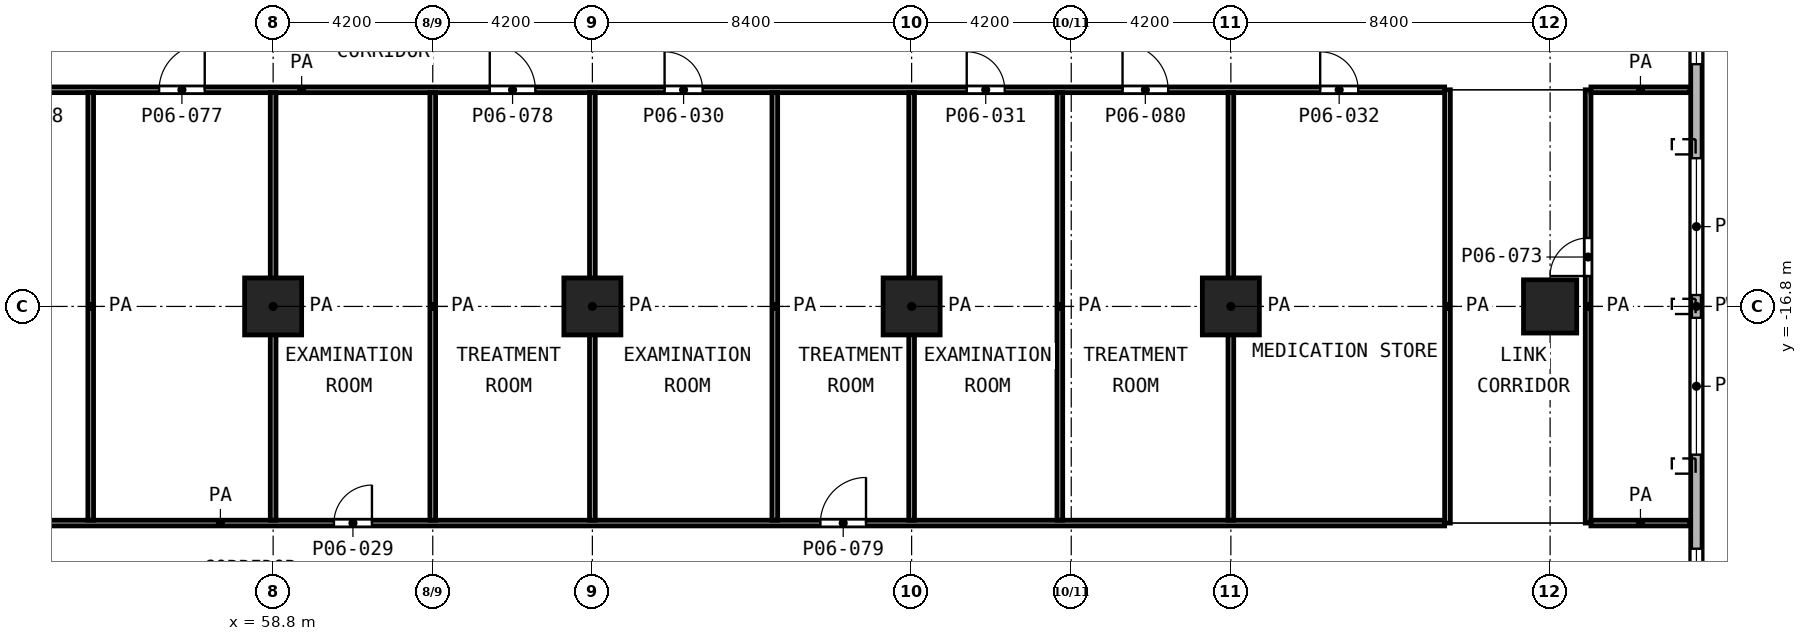
"""IFC4 building model, lengths in metres.
Left out: names, types, materials, properties, quantities, classifications, styles, units other than length and angle.
Written with IfcOpenShell. Run it as: python <this file> out.ifc"""

import sys

from ifc_helpers import new_model, si_unit, direction, frame, frame_2d, origin, origin_2d, place, context, subcontext, project, spatial, rectangle, extrude, element, fill, save


model = new_model("IFC4")
c1 = context("Model", 3, precision=1e-05, world=origin(), true_north=direction((0.0, 1.0)))
c2 = subcontext(c1, "Body", "Model", "MODEL_VIEW")
j1 = project(units=[si_unit("LENGTHUNIT", "METRE"), si_unit("PLANEANGLEUNIT", "RADIAN")], contexts=[c1])
p1 = place(None, origin())
s1 = spatial("IfcSite", under=j1, at=p1, CompositionType="ELEMENT")
p2 = place(p1, origin())
s2 = spatial("IfcBuilding", under=s1, at=p2, CompositionType="ELEMENT")
p3 = place(p2, frame((0.0, 0.0, 29.0)))
s3 = spatial("IfcBuildingStorey", under=s2, at=p3, CompositionType="ELEMENT", Elevation=29.0)
for number, where, z_axis, x_axis in (
    (1, (58.8, -16.8, 0.0), (0.0, 0.0, 1.0), (1.0, 0.0, 0.0)),
    (2, (67.2, -16.8, 0.0), (0.0, 0.0, 1.0), (1.0, 0.0, 0.0)),
    (3, (75.6, -16.8, 0.0), (0.0, 0.0, 1.0), (1.0, 0.0, 0.0)),
    (4, (84.0, -16.8, 0.0), (0.0, 0.0, 1.0), (1.0, 0.0, 0.0)),
):
    element("IfcColumn", number, at=place(p3, frame(where, z_axis=z_axis, x_axis=x_axis)), inside=s3, PredefinedType="COLUMN", context=c2, shape_type="SweptSolid", body=[
        extrude(rectangle(XDim=1.5, YDim=1.5, at=origin_2d()), origin(), (0.0, 0.0, 1.0), 5.2),
    ])
p4 = place(p3, frame((92.4, -16.8, 0.0), z_axis=(0.0, 0.0, 1.0), x_axis=(1.0, 0.0, 0.0)))
e5 = element("IfcColumn", 5, at=p4, inside=s3, PredefinedType="COLUMN", context=c2, shape_type="SweptSolid", body=[
    extrude(rectangle(XDim=1.4, YDim=1.4, at=origin_2d()), origin(), (0.0, 0.0, 1.0), 5.2),
])
p5 = place(p3, frame((96.25, -31.538, 0.0), z_axis=(0.0, 0.0, 1.0), x_axis=(0.0, 1.0, 0.0)))
e6 = element("IfcWall", 6, at=p5, inside=s3, PredefinedType="SOLIDWALL", context=c2, shape_type="SweptSolid", body=[
    extrude(rectangle(XDim=29.476, YDim=0.3, at=frame_2d((14.738, 0.0))), origin(), (0.0, 0.0, 1.0), 4.7),
])
p6 = place(p5, frame((0.438, 0.0, 0.9)))
e7 = element("IfcOpeningElement", 7, at=p6, cuts=e6, PredefinedType="OPENING", context=c2, shape_type="SweptSolid", body=[
    extrude(rectangle(XDim=1.2, YDim=3.0, at=frame_2d((0.6, 1.5))), frame((0.0, 0.16, 0.0), z_axis=(0.0, -1.0, 0.0), x_axis=(1.0, 0.0, 0.0)), (0.0, 0.0, 1.0), 0.32),
])
p7 = place(p5, frame((2.438, 0.0, 0.9)))
e8 = element("IfcOpeningElement", 8, at=p7, cuts=e6, PredefinedType="OPENING", context=c2, shape_type="SweptSolid", body=[
    extrude(rectangle(XDim=3.6, YDim=3.0, at=frame_2d((1.8, 1.5))), frame((0.0, 0.16, 0.0), z_axis=(0.0, -1.0, 0.0), x_axis=(1.0, 0.0, 0.0)), (0.0, 0.0, 1.0), 0.32),
])
p8 = place(p5, frame((7.163, 0.0, 0.9)))
e9 = element("IfcOpeningElement", 9, at=p8, cuts=e6, PredefinedType="OPENING", context=c2, shape_type="SweptSolid", body=[
    extrude(rectangle(XDim=1.2, YDim=3.0, at=frame_2d((0.6, 1.5))), frame((0.0, 0.16, 0.0), z_axis=(0.0, -1.0, 0.0), x_axis=(1.0, 0.0, 0.0)), (0.0, 0.0, 1.0), 0.32),
])
p9 = place(p5, frame((10.838, 0.0, 0.9)))
e10 = element("IfcOpeningElement", 10, at=p9, cuts=e6, PredefinedType="OPENING", context=c2, shape_type="SweptSolid", body=[
    extrude(rectangle(XDim=3.6, YDim=3.0, at=frame_2d((1.8, 1.5))), frame((0.0, 0.16, 0.0), z_axis=(0.0, -1.0, 0.0), x_axis=(1.0, 0.0, 0.0)), (0.0, 0.0, 1.0), 0.32),
])
p10 = place(p5, frame((15.038, 0.0, 0.9)))
e11 = element("IfcOpeningElement", 11, at=p10, cuts=e6, PredefinedType="OPENING", context=c2, shape_type="SweptSolid", body=[
    extrude(rectangle(XDim=3.6, YDim=3.0, at=frame_2d((1.8, 1.5))), frame((0.0, 0.16, 0.0), z_axis=(0.0, -1.0, 0.0), x_axis=(1.0, 0.0, 0.0)), (0.0, 0.0, 1.0), 0.32),
])
p11 = place(p5, frame((21.113, 0.0, 0.9)))
e12 = element("IfcOpeningElement", 12, at=p11, cuts=e6, PredefinedType="OPENING", context=c2, shape_type="SweptSolid", body=[
    extrude(rectangle(XDim=1.2, YDim=3.0, at=frame_2d((0.6, 1.5))), frame((0.0, 0.16, 0.0), z_axis=(0.0, -1.0, 0.0), x_axis=(1.0, 0.0, 0.0)), (0.0, 0.0, 1.0), 0.32),
])
p12 = place(p5, frame((23.438, 0.0, 0.9)))
e13 = element("IfcOpeningElement", 13, at=p12, cuts=e6, PredefinedType="OPENING", context=c2, shape_type="SweptSolid", body=[
    extrude(rectangle(XDim=3.6, YDim=3.0, at=frame_2d((1.8, 1.5))), frame((0.0, 0.16, 0.0), z_axis=(0.0, -1.0, 0.0), x_axis=(1.0, 0.0, 0.0)), (0.0, 0.0, 1.0), 0.32),
])
p13 = place(p5, frame((27.838, 0.0, 0.9)))
e14 = element("IfcOpeningElement", 14, at=p13, cuts=e6, PredefinedType="OPENING", context=c2, shape_type="SweptSolid", body=[
    extrude(rectangle(XDim=1.2, YDim=3.0, at=frame_2d((0.6, 1.5))), frame((0.0, 0.16, 0.0), z_axis=(0.0, -1.0, 0.0), x_axis=(1.0, 0.0, 0.0)), (0.0, 0.0, 1.0), 0.32),
])
p14 = place(p3, frame((25.2, -22.5, 0.0), z_axis=(0.0, 0.0, 1.0), x_axis=(1.0, 0.0, 0.0)))
e15 = element("IfcWall", 15, at=p14, inside=s3, PredefinedType="PARTITIONING", context=c2, shape_type="SweptSolid", body=[
    extrude(rectangle(XDim=64.425, YDim=0.15, at=frame_2d((32.212, 0.0))), origin(), (0.0, 0.0, 1.0), 4.7),
])
p15 = place(p14, frame((1.9, 0.0, 0.0)))
e16 = element("IfcOpeningElement", 16, at=p15, cuts=e15, PredefinedType="OPENING", context=c2, shape_type="SweptSolid", body=[
    extrude(rectangle(XDim=1.0, YDim=2.1, at=frame_2d((0.5, 1.05))), frame((0.0, 0.085, 0.0), z_axis=(0.0, -1.0, 0.0), x_axis=(1.0, 0.0, 0.0)), (0.0, 0.0, 1.0), 0.17),
])
p16 = place(p14, frame((9.85, 0.0, 0.0)))
e17 = element("IfcOpeningElement", 17, at=p16, cuts=e15, PredefinedType="OPENING", context=c2, shape_type="SweptSolid", body=[
    extrude(rectangle(XDim=1.0, YDim=2.1, at=frame_2d((0.5, 1.05))), frame((0.0, 0.085, 0.0), z_axis=(0.0, -1.0, 0.0), x_axis=(1.0, 0.0, 0.0)), (0.0, 0.0, 1.0), 0.17),
])
p17 = place(p14, frame((22.65, 0.0, 0.0)))
e18 = element("IfcOpeningElement", 18, at=p17, cuts=e15, PredefinedType="OPENING", context=c2, shape_type="SweptSolid", body=[
    extrude(rectangle(XDim=1.2, YDim=2.1, at=frame_2d((0.6, 1.05))), frame((0.0, 0.085, 0.0), z_axis=(0.0, -1.0, 0.0), x_axis=(1.0, 0.0, 0.0)), (0.0, 0.0, 1.0), 0.17),
])
p18 = place(p14, frame((35.2, 0.0, 0.0)))
e19 = element("IfcOpeningElement", 19, at=p18, cuts=e15, PredefinedType="OPENING", context=c2, shape_type="SweptSolid", body=[
    extrude(rectangle(XDim=1.0, YDim=2.1, at=frame_2d((0.5, 1.05))), frame((0.0, 0.085, 0.0), z_axis=(0.0, -1.0, 0.0), x_axis=(1.0, 0.0, 0.0)), (0.0, 0.0, 1.0), 0.17),
])
p19 = place(p14, frame((48.0, 0.0, 0.0)))
e20 = element("IfcOpeningElement", 20, at=p19, cuts=e15, PredefinedType="OPENING", context=c2, shape_type="SweptSolid", body=[
    extrude(rectangle(XDim=1.2, YDim=2.1, at=frame_2d((0.6, 1.05))), frame((0.0, 0.085, 0.0), z_axis=(0.0, -1.0, 0.0), x_axis=(1.0, 0.0, 0.0)), (0.0, 0.0, 1.0), 0.17),
])
p20 = place(p3, frame((93.475, -22.5, 0.0), z_axis=(0.0, 0.0, 1.0), x_axis=(1.0, 0.0, 0.0)))
e21 = element("IfcWall", 21, at=p20, inside=s3, PredefinedType="PARTITIONING", context=c2, shape_type="SweptSolid", body=[
    extrude(rectangle(XDim=2.605, YDim=0.15, at=frame_2d((1.302, 0.0))), origin(), (0.0, 0.0, 1.0), 4.7),
])
p21 = place(p3, frame((29.475, -11.1, 0.0), z_axis=(0.0, 0.0, 1.0), x_axis=(1.0, 0.0, 0.0)))
e22 = element("IfcWall", 22, at=p21, inside=s3, PredefinedType="PARTITIONING", context=c2, shape_type="SweptSolid", body=[
    extrude(rectangle(XDim=60.15, YDim=0.15, at=frame_2d((30.075, 0.0))), origin(), (0.0, 0.0, 1.0), 4.7),
])
p22 = place(p21, frame((1.825, 0.0, 0.0)))
e23 = element("IfcOpeningElement", 23, at=p22, cuts=e22, PredefinedType="OPENING", context=c2, shape_type="SweptSolid", body=[
    extrude(rectangle(XDim=1.0, YDim=2.1, at=frame_2d((0.5, 1.05))), frame((0.0, 0.085, 0.0), z_axis=(0.0, -1.0, 0.0), x_axis=(1.0, 0.0, 0.0)), (0.0, 0.0, 1.0), 0.17),
])
p23 = place(p21, frame((9.775, 0.0, 0.0)))
e24 = element("IfcOpeningElement", 24, at=p23, cuts=e22, PredefinedType="OPENING", context=c2, shape_type="SweptSolid", body=[
    extrude(rectangle(XDim=1.0, YDim=2.1, at=frame_2d((0.5, 1.05))), frame((0.0, 0.085, 0.0), z_axis=(0.0, -1.0, 0.0), x_axis=(1.0, 0.0, 0.0)), (0.0, 0.0, 1.0), 0.17),
])
p24 = place(p21, frame((14.275, 0.0, 0.0)))
e25 = element("IfcOpeningElement", 25, at=p24, cuts=e22, PredefinedType="OPENING", context=c2, shape_type="SweptSolid", body=[
    extrude(rectangle(XDim=1.0, YDim=2.1, at=frame_2d((0.5, 1.05))), frame((0.0, 0.085, 0.0), z_axis=(0.0, -1.0, 0.0), x_axis=(1.0, 0.0, 0.0)), (0.0, 0.0, 1.0), 0.17),
])
p25 = place(p21, frame((22.225, 0.0, 0.0)))
e26 = element("IfcOpeningElement", 26, at=p25, cuts=e22, PredefinedType="OPENING", context=c2, shape_type="SweptSolid", body=[
    extrude(rectangle(XDim=1.0, YDim=2.1, at=frame_2d((0.5, 1.05))), frame((0.0, 0.085, 0.0), z_axis=(0.0, -1.0, 0.0), x_axis=(1.0, 0.0, 0.0)), (0.0, 0.0, 1.0), 0.17),
])
p26 = place(p21, frame((26.325, 0.0, 0.0)))
e27 = element("IfcOpeningElement", 27, at=p26, cuts=e22, PredefinedType="OPENING", context=c2, shape_type="SweptSolid", body=[
    extrude(rectangle(XDim=1.2, YDim=2.1, at=frame_2d((0.6, 1.05))), frame((0.0, 0.085, 0.0), z_axis=(0.0, -1.0, 0.0), x_axis=(1.0, 0.0, 0.0)), (0.0, 0.0, 1.0), 0.17),
])
p27 = place(p21, frame((35.025, 0.0, 0.0)))
e28 = element("IfcOpeningElement", 28, at=p27, cuts=e22, PredefinedType="OPENING", context=c2, shape_type="SweptSolid", body=[
    extrude(rectangle(XDim=1.2, YDim=2.1, at=frame_2d((0.6, 1.05))), frame((0.0, 0.085, 0.0), z_axis=(0.0, -1.0, 0.0), x_axis=(1.0, 0.0, 0.0)), (0.0, 0.0, 1.0), 0.17),
])
p28 = place(p21, frame((39.625, 0.0, 0.0)))
e29 = element("IfcOpeningElement", 29, at=p28, cuts=e22, PredefinedType="OPENING", context=c2, shape_type="SweptSolid", body=[
    extrude(rectangle(XDim=1.0, YDim=2.1, at=frame_2d((0.5, 1.05))), frame((0.0, 0.085, 0.0), z_axis=(0.0, -1.0, 0.0), x_axis=(1.0, 0.0, 0.0)), (0.0, 0.0, 1.0), 0.17),
])
p29 = place(p21, frame((47.575, 0.0, 0.0)))
e30 = element("IfcOpeningElement", 30, at=p29, cuts=e22, PredefinedType="OPENING", context=c2, shape_type="SweptSolid", body=[
    extrude(rectangle(XDim=1.0, YDim=2.1, at=frame_2d((0.5, 1.05))), frame((0.0, 0.085, 0.0), z_axis=(0.0, -1.0, 0.0), x_axis=(1.0, 0.0, 0.0)), (0.0, 0.0, 1.0), 0.17),
])
p30 = place(p21, frame((51.675, 0.0, 0.0)))
e31 = element("IfcOpeningElement", 31, at=p30, cuts=e22, PredefinedType="OPENING", context=c2, shape_type="SweptSolid", body=[
    extrude(rectangle(XDim=1.2, YDim=2.1, at=frame_2d((0.6, 1.05))), frame((0.0, 0.085, 0.0), z_axis=(0.0, -1.0, 0.0), x_axis=(1.0, 0.0, 0.0)), (0.0, 0.0, 1.0), 0.17),
])
p31 = place(p21, frame((56.875, 0.0, 0.0)))
e32 = element("IfcOpeningElement", 32, at=p31, cuts=e22, PredefinedType="OPENING", context=c2, shape_type="SweptSolid", body=[
    extrude(rectangle(XDim=1.0, YDim=2.1, at=frame_2d((0.5, 1.05))), frame((0.0, 0.085, 0.0), z_axis=(0.0, -1.0, 0.0), x_axis=(1.0, 0.0, 0.0)), (0.0, 0.0, 1.0), 0.17),
])
p32 = place(p3, frame((93.475, -11.1, 0.0), z_axis=(0.0, 0.0, 1.0), x_axis=(1.0, 0.0, 0.0)))
e33 = element("IfcWall", 33, at=p32, inside=s3, PredefinedType="PARTITIONING", context=c2, shape_type="SweptSolid", body=[
    extrude(rectangle(XDim=2.605, YDim=0.15, at=frame_2d((1.302, 0.0))), origin(), (0.0, 0.0, 1.0), 4.7),
])
for number, where, z_axis, x_axis in (
    (34, (54.0, -22.425, 0.0), (0.0, 0.0, 1.0), (0.0, 1.0, 0.0)),
    (35, (58.8, -22.425, 0.0), (0.0, 0.0, 1.0), (0.0, 1.0, 0.0)),
    (36, (63.0, -22.425, 0.0), (0.0, 0.0, 1.0), (0.0, 1.0, 0.0)),
    (37, (67.2, -22.425, 0.0), (0.0, 0.0, 1.0), (0.0, 1.0, 0.0)),
    (38, (72.0, -22.425, 0.0), (0.0, 0.0, 1.0), (0.0, 1.0, 0.0)),
    (39, (75.6, -22.425, 0.0), (0.0, 0.0, 1.0), (0.0, 1.0, 0.0)),
    (40, (79.5, -22.425, 0.0), (0.0, 0.0, 1.0), (0.0, 1.0, 0.0)),
    (41, (84.0, -22.425, 0.0), (0.0, 0.0, 1.0), (0.0, 1.0, 0.0)),
):
    element("IfcWall", number, at=place(p3, frame(where, z_axis=z_axis, x_axis=x_axis)), inside=s3, PredefinedType="PARTITIONING", context=c2, shape_type="SweptSolid", body=[
        extrude(rectangle(XDim=11.25, YDim=0.15, at=frame_2d((5.625, 0.0))), origin(), (0.0, 0.0, 1.0), 4.7),
    ])
p33 = place(p3, frame((89.7, -22.5, 0.0), z_axis=(0.0, 0.0, 1.0), x_axis=(0.0, 1.0, 0.0)))
e42 = element("IfcWall", 42, at=p33, inside=s3, PredefinedType="PARTITIONING", context=c2, shape_type="SweptSolid", body=[
    extrude(rectangle(XDim=11.4, YDim=0.15, at=frame_2d((5.7, 0.0))), origin(), (0.0, 0.0, 1.0), 4.7),
])
p34 = place(p3, frame((93.4, -22.5, 0.0), z_axis=(0.0, 0.0, 1.0), x_axis=(0.0, 1.0, 0.0)))
e43 = element("IfcWall", 43, at=p34, inside=s3, PredefinedType="PARTITIONING", context=c2, shape_type="SweptSolid", body=[
    extrude(rectangle(XDim=11.4, YDim=0.15, at=frame_2d((5.7, 0.0))), origin(), (0.0, 0.0, 1.0), 4.7),
])
p35 = place(p34, frame((6.5, 0.0, 0.0)))
e44 = element("IfcOpeningElement", 44, at=p35, cuts=e43, PredefinedType="OPENING", context=c2, shape_type="SweptSolid", body=[
    extrude(rectangle(XDim=1.0, YDim=2.1, at=frame_2d((0.5, 1.05))), frame((0.0, 0.085, 0.0), z_axis=(0.0, -1.0, 0.0), x_axis=(1.0, 0.0, 0.0)), (0.0, 0.0, 1.0), 0.17),
])
p36 = place(p8, origin())
e45 = element("IfcWindow", 45, at=p36, inside=s3, PartitioningType="SINGLE_PANEL", PredefinedType="WINDOW", context=c2, shape_type="SweptSolid", body=[
    extrude(rectangle(XDim=1.2, YDim=3.0, at=frame_2d((0.6, 1.5))), frame((0.0, 0.03, 0.0), z_axis=(0.0, -1.0, 0.0), x_axis=(1.0, 0.0, 0.0)), (0.0, 0.0, 1.0), 0.06),
])
fill(e9, e45)
p37 = place(p9, origin())
e46 = element("IfcWindow", 46, at=p37, inside=s3, PartitioningType="SINGLE_PANEL", PredefinedType="WINDOW", context=c2, shape_type="SweptSolid", body=[
    extrude(rectangle(XDim=3.6, YDim=3.0, at=frame_2d((1.8, 1.5))), frame((0.0, 0.03, 0.0), z_axis=(0.0, -1.0, 0.0), x_axis=(1.0, 0.0, 0.0)), (0.0, 0.0, 1.0), 0.06),
])
fill(e10, e46)
p38 = place(p10, origin())
e47 = element("IfcWindow", 47, at=p38, inside=s3, PartitioningType="SINGLE_PANEL", PredefinedType="WINDOW", context=c2, shape_type="SweptSolid", body=[
    extrude(rectangle(XDim=3.6, YDim=3.0, at=frame_2d((1.8, 1.5))), frame((0.0, 0.03, 0.0), z_axis=(0.0, -1.0, 0.0), x_axis=(1.0, 0.0, 0.0)), (0.0, 0.0, 1.0), 0.06),
])
fill(e11, e47)
p39 = place(p11, origin())
e48 = element("IfcWindow", 48, at=p39, inside=s3, PartitioningType="SINGLE_PANEL", PredefinedType="WINDOW", context=c2, shape_type="SweptSolid", body=[
    extrude(rectangle(XDim=1.2, YDim=3.0, at=frame_2d((0.6, 1.5))), frame((0.0, 0.03, 0.0), z_axis=(0.0, -1.0, 0.0), x_axis=(1.0, 0.0, 0.0)), (0.0, 0.0, 1.0), 0.06),
])
fill(e12, e48)
p40 = place(p26, origin())
e49 = element("IfcDoor", 49, at=p40, inside=s3, OperationType="SINGLE_SWING_RIGHT", PredefinedType="DOOR", context=c2, shape_type="SweptSolid", body=[
    extrude(rectangle(XDim=1.2, YDim=2.1, at=frame_2d((0.6, 1.05))), frame((0.0, 0.025, 0.0), z_axis=(0.0, -1.0, 0.0), x_axis=(1.0, 0.0, 0.0)), (0.0, 0.0, 1.0), 0.05),
])
fill(e27, e49)
p41 = place(p18, origin())
e50 = element("IfcDoor", 50, at=p41, inside=s3, OperationType="SINGLE_SWING_RIGHT", PredefinedType="DOOR", context=c2, shape_type="SweptSolid", body=[
    extrude(rectangle(XDim=1.0, YDim=2.1, at=frame_2d((0.5, 1.05))), frame((0.0, 0.025, 0.0), z_axis=(0.0, -1.0, 0.0), x_axis=(1.0, 0.0, 0.0)), (0.0, 0.0, 1.0), 0.05),
])
fill(e19, e50)
p42 = place(p27, origin())
e51 = element("IfcDoor", 51, at=p42, inside=s3, OperationType="SINGLE_SWING_LEFT", PredefinedType="DOOR", context=c2, shape_type="SweptSolid", body=[
    extrude(rectangle(XDim=1.2, YDim=2.1, at=frame_2d((0.6, 1.05))), frame((0.0, 0.025, 0.0), z_axis=(0.0, -1.0, 0.0), x_axis=(1.0, 0.0, 0.0)), (0.0, 0.0, 1.0), 0.05),
])
fill(e28, e51)
p43 = place(p28, origin())
e52 = element("IfcDoor", 52, at=p43, inside=s3, OperationType="SINGLE_SWING_LEFT", PredefinedType="DOOR", context=c2, shape_type="SweptSolid", body=[
    extrude(rectangle(XDim=1.0, YDim=2.1, at=frame_2d((0.5, 1.05))), frame((0.0, 0.025, 0.0), z_axis=(0.0, -1.0, 0.0), x_axis=(1.0, 0.0, 0.0)), (0.0, 0.0, 1.0), 0.05),
])
fill(e29, e52)
p44 = place(p19, origin())
e53 = element("IfcDoor", 53, at=p44, inside=s3, OperationType="SINGLE_SWING_RIGHT", PredefinedType="DOOR", context=c2, shape_type="SweptSolid", body=[
    extrude(rectangle(XDim=1.2, YDim=2.1, at=frame_2d((0.6, 1.05))), frame((0.0, 0.025, 0.0), z_axis=(0.0, -1.0, 0.0), x_axis=(1.0, 0.0, 0.0)), (0.0, 0.0, 1.0), 0.05),
])
fill(e20, e53)
p45 = place(p29, origin())
e54 = element("IfcDoor", 54, at=p45, inside=s3, OperationType="SINGLE_SWING_LEFT", PredefinedType="DOOR", context=c2, shape_type="SweptSolid", body=[
    extrude(rectangle(XDim=1.0, YDim=2.1, at=frame_2d((0.5, 1.05))), frame((0.0, 0.025, 0.0), z_axis=(0.0, -1.0, 0.0), x_axis=(1.0, 0.0, 0.0)), (0.0, 0.0, 1.0), 0.05),
])
fill(e30, e54)
p46 = place(p30, origin())
e55 = element("IfcDoor", 55, at=p46, inside=s3, OperationType="SINGLE_SWING_LEFT", PredefinedType="DOOR", context=c2, shape_type="SweptSolid", body=[
    extrude(rectangle(XDim=1.2, YDim=2.1, at=frame_2d((0.6, 1.05))), frame((0.0, 0.025, 0.0), z_axis=(0.0, -1.0, 0.0), x_axis=(1.0, 0.0, 0.0)), (0.0, 0.0, 1.0), 0.05),
])
fill(e31, e55)
p47 = place(p31, origin())
e56 = element("IfcDoor", 56, at=p47, inside=s3, OperationType="SINGLE_SWING_LEFT", PredefinedType="DOOR", context=c2, shape_type="SweptSolid", body=[
    extrude(rectangle(XDim=1.0, YDim=2.1, at=frame_2d((0.5, 1.05))), frame((0.0, 0.025, 0.0), z_axis=(0.0, -1.0, 0.0), x_axis=(1.0, 0.0, 0.0)), (0.0, 0.0, 1.0), 0.05),
])
fill(e32, e56)
p48 = place(p35, origin())
e57 = element("IfcDoor", 57, at=p48, inside=s3, OperationType="SINGLE_SWING_LEFT", PredefinedType="DOOR", context=c2, shape_type="SweptSolid", body=[
    extrude(rectangle(XDim=1.0, YDim=2.1, at=frame_2d((0.5, 1.05))), frame((0.0, 0.025, 0.0), z_axis=(0.0, -1.0, 0.0), x_axis=(1.0, 0.0, 0.0)), (0.0, 0.0, 1.0), 0.05),
])
fill(e44, e57)
save(model, sys.argv[1])
